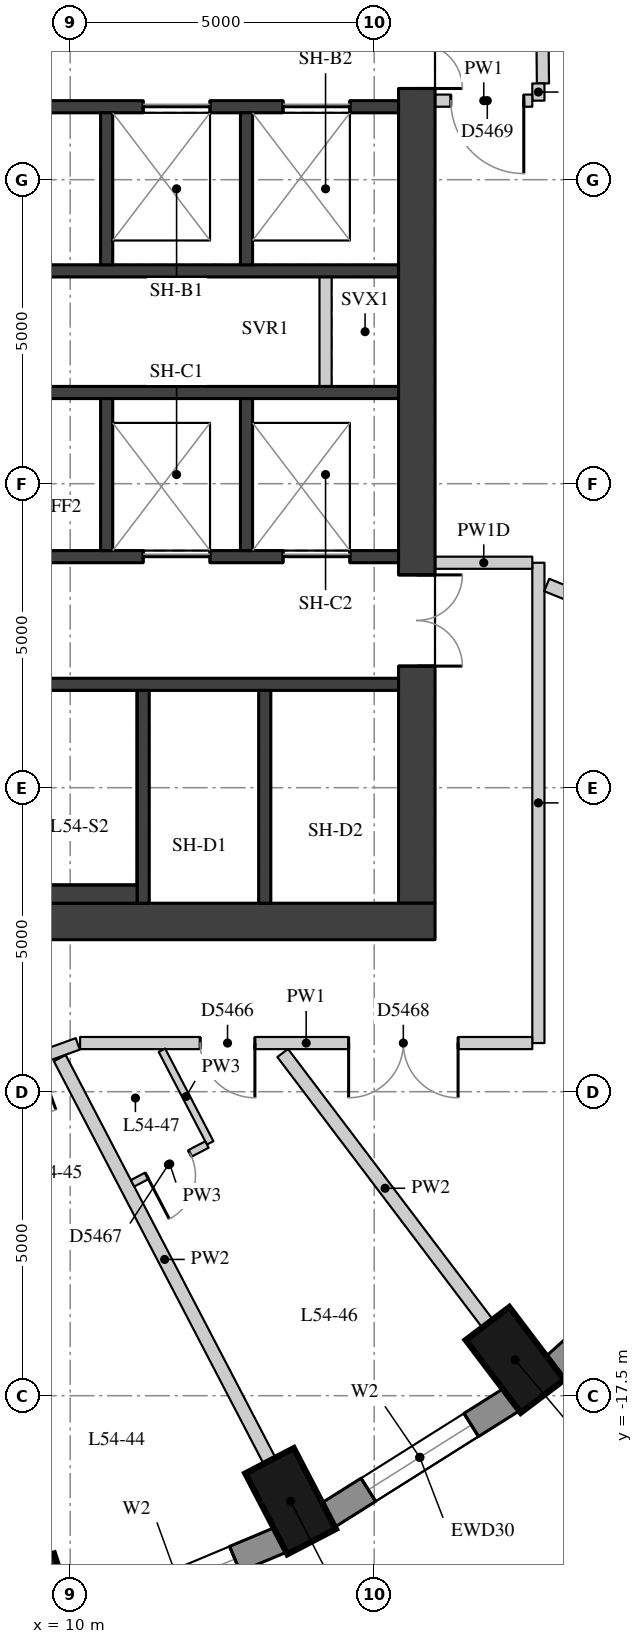
"""IFC4 building model, lengths in metres.
Left out: names, types, materials, properties, quantities, classifications, styles, units other than length and angle.
Written with IfcOpenShell. Run it as: python <this file> out.ifc"""

import sys

from ifc_helpers import new_model, si_unit, direction, frame, frame_2d, origin, origin_2d, place, context, subcontext, project, spatial, rectangle, extrude, element, fill, save


model = new_model("IFC4")
c1 = context("Model", 3, precision=1e-05, world=origin(), true_north=direction((0.0, 1.0)))
c2 = subcontext(c1, "Body", "Model", "MODEL_VIEW")
j1 = project(units=[si_unit("LENGTHUNIT", "METRE"), si_unit("PLANEANGLEUNIT", "RADIAN")], contexts=[c1])
p1 = place(None, origin())
s1 = spatial("IfcSite", under=j1, at=p1, CompositionType="ELEMENT")
p2 = place(p1, origin())
s2 = spatial("IfcBuilding", under=s1, at=p2, CompositionType="ELEMENT")
p3 = place(p2, frame((0.0, 0.0, 192.5)))
s3 = spatial("IfcBuildingStorey", under=s2, at=p3, CompositionType="ELEMENT", Elevation=192.5)
for number, where, z_axis, x_axis in (
    (1, (9.541, -20.948, 0.0), (0.0, 0.0, 1.0), (0.312, -0.95, 0.0)),
    (2, (13.625, -19.235, 0.0), (0.0, 0.0, 1.0), (0.462, -0.887, 0.0)),
    (3, (17.316, -16.911, 0.0), (0.0, 0.0, 1.0), (0.604, -0.797, 0.0)),
):
    element("IfcColumn", number, at=place(p3, frame(where, z_axis=z_axis, x_axis=x_axis)), inside=s3, PredefinedType="COLUMN", context=c2, shape_type="SweptSolid", body=[
        extrude(rectangle(XDim=1.5, YDim=0.9, at=origin_2d()), origin(), (0.0, 0.0, 1.0), 3.3),
    ])
p4 = place(p3, frame((10.103, -21.279, 0.0), z_axis=(0.0, 0.0, 1.0), x_axis=(0.922168222612, 0.386789050006, 0.0)))
e4 = element("IfcWall", 4, at=p4, inside=s3, PredefinedType="SOLIDWALL", context=c2, shape_type="SweptSolid", body=[
    extrude(rectangle(XDim=3.651, YDim=0.45, at=frame_2d((1.825, 0.0))), origin(), (0.0, 0.0, 1.0), 3.02),
])
p5 = place(p4, frame((0.825, 0.0, 0.4)))
e5 = element("IfcOpeningElement", 5, at=p5, cuts=e4, PredefinedType="OPENING", context=c2, shape_type="SweptSolid", body=[
    extrude(rectangle(XDim=2.0, YDim=1.75, at=frame_2d((1.0, 0.875))), frame((0.0, 0.235, 0.0), z_axis=(0.0, -1.0, 0.0), x_axis=(1.0, 0.0, 0.0)), (0.0, 0.0, 1.0), 0.47),
])
p6 = place(p3, frame((14.232, -19.47, 0.0), z_axis=(0.0, 0.0, 1.0), x_axis=(0.84614984472, 0.532945063098, 0.0)))
e6 = element("IfcWall", 6, at=p6, inside=s3, PredefinedType="SOLIDWALL", context=c2, shape_type="SweptSolid", body=[
    extrude(rectangle(XDim=3.586, YDim=0.45, at=frame_2d((1.793, 0.0))), origin(), (0.0, 0.0, 1.0), 3.02),
])
p7 = place(p6, frame((0.793, 0.0, 0.4)))
e7 = element("IfcOpeningElement", 7, at=p7, cuts=e6, PredefinedType="OPENING", context=c2, shape_type="SweptSolid", body=[
    extrude(rectangle(XDim=2.0, YDim=1.75, at=frame_2d((1.0, 0.875))), frame((0.0, 0.235, 0.0), z_axis=(0.0, -1.0, 0.0), x_axis=(1.0, 0.0, 0.0)), (0.0, 0.0, 1.0), 0.47),
])
p8 = place(p3, frame((17.953, -17.04, 0.0), z_axis=(0.0, 0.0, 1.0), x_axis=(0.743442727602, 0.668799604348, 0.0)))
e8 = element("IfcWall", 8, at=p8, inside=s3, PredefinedType="SOLIDWALL", context=c2, shape_type="SweptSolid", body=[
    extrude(rectangle(XDim=3.513, YDim=0.45, at=frame_2d((1.756, 0.0))), origin(), (0.0, 0.0, 1.0), 3.02),
])
p9 = place(p3, frame((15.7, -9.4, 0.0), z_axis=(0.0, 0.0, 1.0), x_axis=(0.0, 1.0, 0.0)))
e9 = element("IfcWall", 9, at=p9, inside=s3, PredefinedType="SHEAR", context=c2, shape_type="SweptSolid", body=[
    extrude(rectangle(XDim=18.8, YDim=0.6, at=frame_2d((9.4, 0.0))), origin(), (0.0, 0.0, 1.0), 3.02),
])
p10 = place(p9, frame((13.4, 0.0, 0.0)))
e10 = element("IfcOpeningElement", 10, at=p10, cuts=e9, PredefinedType="OPENING", context=c2, shape_type="SweptSolid", body=[
    extrude(rectangle(XDim=1.5, YDim=2.1, at=frame_2d((0.75, 1.05))), frame((0.0, 0.31, 0.0), z_axis=(0.0, -1.0, 0.0), x_axis=(1.0, 0.0, 0.0)), (0.0, 0.0, 1.0), 0.62),
])
p11 = place(p9, frame((3.9, 0.0, 0.0)))
e11 = element("IfcOpeningElement", 11, at=p11, cuts=e9, PredefinedType="OPENING", context=c2, shape_type="SweptSolid", body=[
    extrude(rectangle(XDim=1.5, YDim=2.1, at=frame_2d((0.75, 1.05))), frame((0.0, 0.31, 0.0), z_axis=(0.0, -1.0, 0.0), x_axis=(1.0, 0.0, 0.0)), (0.0, 0.0, 1.0), 0.62),
])
p12 = place(p3, frame((4.0, -9.7, 0.0), z_axis=(0.0, 0.0, 1.0), x_axis=(1.0, 0.0, 0.0)))
e12 = element("IfcWall", 12, at=p12, inside=s3, PredefinedType="SHEAR", context=c2, shape_type="SweptSolid", body=[
    extrude(rectangle(XDim=12.0, YDim=0.6, at=frame_2d((6.0, 0.0))), origin(), (0.0, 0.0, 1.0), 3.02),
])
p13 = place(p3, frame((4.6, 3.7, 0.0), z_axis=(0.0, 0.0, 1.0), x_axis=(1.0, 0.0, 0.0)))
e13 = element("IfcWall", 13, at=p13, inside=s3, PredefinedType="SHEAR", context=c2, shape_type="SweptSolid", body=[
    extrude(rectangle(XDim=10.8, YDim=0.2, at=frame_2d((5.4, 0.0))), origin(), (0.0, 0.0, 1.0), 3.02),
])
p14 = place(p13, frame((6.6, 0.0, 0.0)))
e14 = element("IfcOpeningElement", 14, at=p14, cuts=e13, PredefinedType="OPENING", context=c2, shape_type="SweptSolid", body=[
    extrude(rectangle(XDim=1.1, YDim=2.1, at=frame_2d((0.55, 1.05))), frame((0.0, 0.11, 0.0), z_axis=(0.0, -1.0, 0.0), x_axis=(1.0, 0.0, 0.0)), (0.0, 0.0, 1.0), 0.22),
])
p15 = place(p13, frame((8.9, 0.0, 0.0)))
e15 = element("IfcOpeningElement", 15, at=p15, cuts=e13, PredefinedType="OPENING", context=c2, shape_type="SweptSolid", body=[
    extrude(rectangle(XDim=1.1, YDim=2.1, at=frame_2d((0.55, 1.05))), frame((0.0, 0.11, 0.0), z_axis=(0.0, -1.0, 0.0), x_axis=(1.0, 0.0, 0.0)), (0.0, 0.0, 1.0), 0.22),
])
for number, where, z_axis, x_axis in (
    (16, (4.6, 1.0, 0.0), (0.0, 0.0, 1.0), (1.0, 0.0, 0.0)),
    (17, (4.6, -1.0, 0.0), (0.0, 0.0, 1.0), (1.0, 0.0, 0.0)),
):
    element("IfcWall", number, at=place(p3, frame(where, z_axis=z_axis, x_axis=x_axis)), inside=s3, PredefinedType="SHEAR", context=c2, shape_type="SweptSolid", body=[
        extrude(rectangle(XDim=10.8, YDim=0.2, at=frame_2d((5.4, 0.0))), origin(), (0.0, 0.0, 1.0), 3.02),
    ])
p16 = place(p3, frame((4.6, -3.7, 0.0), z_axis=(0.0, 0.0, 1.0), x_axis=(1.0, 0.0, 0.0)))
e18 = element("IfcWall", 18, at=p16, inside=s3, PredefinedType="SHEAR", context=c2, shape_type="SweptSolid", body=[
    extrude(rectangle(XDim=10.8, YDim=0.2, at=frame_2d((5.4, 0.0))), origin(), (0.0, 0.0, 1.0), 3.02),
])
p17 = place(p16, frame((6.6, 0.0, 0.0)))
e19 = element("IfcOpeningElement", 19, at=p17, cuts=e18, PredefinedType="OPENING", context=c2, shape_type="SweptSolid", body=[
    extrude(rectangle(XDim=1.1, YDim=2.1, at=frame_2d((0.55, 1.05))), frame((0.0, 0.11, 0.0), z_axis=(0.0, -1.0, 0.0), x_axis=(1.0, 0.0, 0.0)), (0.0, 0.0, 1.0), 0.22),
])
p18 = place(p16, frame((8.9, 0.0, 0.0)))
e20 = element("IfcOpeningElement", 20, at=p18, cuts=e18, PredefinedType="OPENING", context=c2, shape_type="SweptSolid", body=[
    extrude(rectangle(XDim=1.1, YDim=2.1, at=frame_2d((0.55, 1.05))), frame((0.0, 0.11, 0.0), z_axis=(0.0, -1.0, 0.0), x_axis=(1.0, 0.0, 0.0)), (0.0, 0.0, 1.0), 0.22),
])
p19 = place(p3, frame((4.6, -5.8, 0.0), z_axis=(0.0, 0.0, 1.0), x_axis=(1.0, 0.0, 0.0)))
e21 = element("IfcWall", 21, at=p19, inside=s3, PredefinedType="SHEAR", context=c2, shape_type="SweptSolid", body=[
    extrude(rectangle(XDim=10.8, YDim=0.2, at=frame_2d((5.4, 0.0))), origin(), (0.0, 0.0, 1.0), 3.02),
])
for number, where, z_axis, x_axis in (
    (22, (11.2, -9.4, 0.0), (0.0, 0.0, 1.0), (0.0, 1.0, 0.0)),
    (23, (13.2, -9.4, 0.0), (0.0, 0.0, 1.0), (0.0, 1.0, 0.0)),
):
    element("IfcWall", number, at=place(p3, frame(where, z_axis=z_axis, x_axis=x_axis)), inside=s3, PredefinedType="SHEAR", context=c2, shape_type="SweptSolid", body=[
        extrude(rectangle(XDim=3.5, YDim=0.2, at=frame_2d((1.75, 0.0))), origin(), (0.0, 0.0, 1.0), 3.02),
    ])
for number, where, z_axis, x_axis in (
    (24, (10.6, 1.1, 0.0), (0.0, 0.0, 1.0), (0.0, 1.0, 0.0)),
    (25, (10.6, -3.6, 0.0), (0.0, 0.0, 1.0), (0.0, 1.0, 0.0)),
    (26, (12.9, 1.1, 0.0), (0.0, 0.0, 1.0), (0.0, 1.0, 0.0)),
    (27, (12.9, -3.6, 0.0), (0.0, 0.0, 1.0), (0.0, 1.0, 0.0)),
):
    element("IfcWall", number, at=place(p3, frame(where, z_axis=z_axis, x_axis=x_axis)), inside=s3, PredefinedType="SHEAR", context=c2, shape_type="SweptSolid", body=[
        extrude(rectangle(XDim=2.5, YDim=0.2, at=frame_2d((1.25, 0.0))), origin(), (0.0, 0.0, 1.0), 3.02),
    ])
p20 = place(p3, frame((14.2, -0.9, 0.0), z_axis=(0.0, 0.0, 1.0), x_axis=(0.0, 1.0, 0.0)))
e28 = element("IfcWall", 28, at=p20, inside=s3, PredefinedType="PARTITIONING", context=c2, shape_type="SweptSolid", body=[
    extrude(rectangle(XDim=1.8, YDim=0.2, at=frame_2d((0.9, 0.0))), origin(), (0.0, 0.0, 1.0), 3.02),
])
p21 = place(p3, frame((6.22, -9.25, 0.0), z_axis=(0.0, 0.0, 1.0), x_axis=(1.0, 0.0, 0.0)))
e29 = element("IfcWall", 29, at=p21, inside=s3, PredefinedType="PARTITIONING", context=c2, shape_type="SweptSolid", body=[
    extrude(rectangle(XDim=4.88, YDim=0.3, at=frame_2d((2.44, 0.0))), origin(), (0.0, 0.0, 1.0), 3.02),
])
p22 = place(p3, frame((17.7, -3.8, 0.0), z_axis=(0.0, 0.0, 1.0), x_axis=(0.0, -1.0, 0.0)))
e30 = element("IfcWall", 30, at=p22, inside=s3, PredefinedType="PARTITIONING", context=c2, shape_type="SweptSolid", body=[
    extrude(rectangle(XDim=7.9, YDim=0.2, at=frame_2d((3.95, 0.0))), origin(), (0.0, 0.0, 1.0), 3.02),
])
p23 = place(p3, frame((17.6, -11.7, 0.0), z_axis=(0.0, 0.0, 1.0), x_axis=(-1.0, 0.0, 0.0)))
e31 = element("IfcWall", 31, at=p23, inside=s3, PredefinedType="PARTITIONING", context=c2, shape_type="SweptSolid", body=[
    extrude(rectangle(XDim=7.437, YDim=0.2, at=frame_2d((3.719, 0.0))), origin(), (0.0, 0.0, 1.0), 3.02),
])
p24 = place(p23, frame((4.562, 0.0, 0.0)))
e32 = element("IfcOpeningElement", 32, at=p24, cuts=e31, PredefinedType="OPENING", context=c2, shape_type="SweptSolid", body=[
    extrude(rectangle(XDim=0.9, YDim=2.1, at=frame_2d((0.45, 1.05))), frame((0.0, 0.11, 0.0), z_axis=(0.0, -1.0, 0.0), x_axis=(1.0, 0.0, 0.0)), (0.0, 0.0, 1.0), 0.22),
])
p25 = place(p23, frame((1.22, 0.0, 0.0)))
e33 = element("IfcOpeningElement", 33, at=p25, cuts=e31, PredefinedType="OPENING", context=c2, shape_type="SweptSolid", body=[
    extrude(rectangle(XDim=1.8, YDim=2.1, at=frame_2d((0.9, 1.05))), frame((0.0, 0.11, 0.0), z_axis=(0.0, -1.0, 0.0), x_axis=(1.0, 0.0, 0.0)), (0.0, 0.0, 1.0), 0.22),
])
p26 = place(p3, frame((10.125, -11.714, 0.0), z_axis=(0.0, 0.0, 1.0), x_axis=(-0.940958661946, -0.338521486038, 0.0)))
e34 = element("IfcWall", 34, at=p26, inside=s3, PredefinedType="PARTITIONING", context=c2, shape_type="SweptSolid", body=[
    extrude(rectangle(XDim=6.594, YDim=0.2, at=frame_2d((3.297, 0.0))), origin(), (0.0, 0.0, 1.0), 3.02),
])
p27 = place(p26, frame((3.809, 0.0, 0.0)))
e35 = element("IfcOpeningElement", 35, at=p27, cuts=e34, PredefinedType="OPENING", context=c2, shape_type="SweptSolid", body=[
    extrude(rectangle(XDim=0.9, YDim=2.1, at=frame_2d((0.45, 1.05))), frame((0.0, 0.11, 0.0), z_axis=(0.0, -1.0, 0.0), x_axis=(1.0, 0.0, 0.0)), (0.0, 0.0, 1.0), 0.22),
])
p28 = place(p26, frame((0.706, 0.0, 0.0)))
e36 = element("IfcOpeningElement", 36, at=p28, cuts=e34, PredefinedType="OPENING", context=c2, shape_type="SweptSolid", body=[
    extrude(rectangle(XDim=0.9, YDim=2.1, at=frame_2d((0.45, 1.05))), frame((0.0, 0.11, 0.0), z_axis=(0.0, -1.0, 0.0), x_axis=(1.0, 0.0, 0.0)), (0.0, 0.0, 1.0), 0.22),
])
p29 = place(p3, frame((17.701, 11.6, 0.0), z_axis=(0.0, 0.0, 1.0), x_axis=(0.009840700525, -0.999951579134, 0.0)))
e37 = element("IfcWall", 37, at=p29, inside=s3, PredefinedType="PARTITIONING", context=c2, shape_type="SweptSolid", body=[
    extrude(rectangle(XDim=7.517, YDim=0.2, at=frame_2d((3.759, 0.0))), origin(), (0.0, 0.0, 1.0), 3.02),
])
p30 = place(p3, frame((17.7, 4.083, 0.0), z_axis=(0.0, 0.0, 1.0), x_axis=(0.0, -1.0, 0.0)))
e38 = element("IfcWall", 38, at=p30, inside=s3, PredefinedType="PARTITIONING", context=c2, shape_type="SweptSolid", body=[
    extrude(rectangle(XDim=0.283, YDim=0.2, at=frame_2d((0.142, 0.0))), origin(), (0.0, 0.0, 1.0), 3.02),
])
p31 = place(p3, frame((17.6, 3.8, 0.0), z_axis=(0.0, 0.0, 1.0), x_axis=(-1.0, 0.0, 0.0)))
e39 = element("IfcWall", 39, at=p31, inside=s3, PredefinedType="PARTITIONING", context=c2, shape_type="SweptSolid", body=[
    extrude(rectangle(XDim=1.596, YDim=0.2, at=frame_2d((0.798, 0.0))), origin(), (0.0, 0.0, 1.0), 3.02),
])
p32 = place(p31, frame((0.14, 0.0, 0.0)))
e40 = element("IfcOpeningElement", 40, at=p32, cuts=e39, PredefinedType="OPENING", context=c2, shape_type="SweptSolid", body=[
    extrude(rectangle(XDim=1.2, YDim=2.1, at=frame_2d((0.6, 1.05))), frame((0.0, 0.11, 0.0), z_axis=(0.0, -1.0, 0.0), x_axis=(1.0, 0.0, 0.0)), (0.0, 0.0, 1.0), 0.22),
])
p33 = place(p3, frame((16.004, -3.8, 0.0), z_axis=(0.0, 0.0, 1.0), x_axis=(1.0, 0.0, 0.0)))
e41 = element("IfcWall", 41, at=p33, inside=s3, PredefinedType="PARTITIONING", context=c2, shape_type="SweptSolid", body=[
    extrude(rectangle(XDim=1.596, YDim=0.2, at=frame_2d((0.798, 0.0))), origin(), (0.0, 0.0, 1.0), 2.47),
])
p34 = place(p3, frame((13.279, -18.57, 0.0), z_axis=(0.0, 0.0, 1.0), x_axis=(-0.461996036885, 0.886881988712, 0.0)))
e42 = element("IfcWall", 42, at=p34, inside=s3, PredefinedType="PARTITIONING", context=c2, shape_type="SweptSolid", body=[
    extrude(rectangle(XDim=7.467, YDim=0.22, at=frame_2d((3.733, 0.0))), origin(), (0.0, 0.0, 1.0), 3.02),
])
p35 = place(p3, frame((16.863, -16.312, 0.0), z_axis=(0.0, 0.0, 1.0), x_axis=(-0.603626861738, 0.797266963939, 0.0)))
e43 = element("IfcWall", 43, at=p35, inside=s3, PredefinedType="PARTITIONING", context=c2, shape_type="SweptSolid", body=[
    extrude(rectangle(XDim=5.58, YDim=0.22, at=frame_2d((2.79, 0.0))), origin(), (0.0, 0.0, 1.0), 3.02),
])
p36 = place(p3, frame((24.295, -6.771, 0.0), z_axis=(0.0, 0.0, 1.0), x_axis=(-0.927387137769, 0.374103056256, 0.0)))
e44 = element("IfcWall", 44, at=p36, inside=s3, PredefinedType="PARTITIONING", context=c2, shape_type="SweptSolid", body=[
    extrude(rectangle(XDim=6.964, YDim=0.22, at=frame_2d((3.482, 0.0))), origin(), (0.0, 0.0, 1.0), 3.02),
])
p37 = place(p3, frame((11.509, -11.818, 0.0), z_axis=(0.0, 0.0, 1.0), x_axis=(0.461987980812, -0.886886185249, 0.0)))
e45 = element("IfcWall", 45, at=p37, inside=s3, PredefinedType="PARTITIONING", context=c2, shape_type="SweptSolid", body=[
    extrude(rectangle(XDim=1.718, YDim=0.12, at=frame_2d((0.859, 0.0))), origin(), (0.0, 0.0, 1.0), 3.02),
])
p38 = place(p3, frame((12.249, -13.369, 0.0), z_axis=(0.0, 0.0, 1.0), x_axis=(-0.886834011057, -0.462088126695, 0.0)))
e46 = element("IfcWall", 46, at=p38, inside=s3, PredefinedType="PARTITIONING", context=c2, shape_type="SweptSolid", body=[
    extrude(rectangle(XDim=1.379, YDim=0.12, at=frame_2d((0.69, 0.0))), origin(), (0.0, 0.0, 1.0), 3.02),
])
p39 = place(p38, frame((0.315, 0.0, 0.0)))
e47 = element("IfcOpeningElement", 47, at=p39, cuts=e46, PredefinedType="OPENING", context=c2, shape_type="SweptSolid", body=[
    extrude(rectangle(XDim=0.8, YDim=2.1, at=frame_2d((0.4, 1.05))), frame((0.0, 0.07, 0.0), z_axis=(0.0, -1.0, 0.0), x_axis=(1.0, 0.0, 0.0)), (0.0, 0.0, 1.0), 0.14),
])
p40 = place(p5, origin())
e48 = element("IfcWindow", 48, at=p40, inside=s3, PartitioningType="SINGLE_PANEL", PredefinedType="WINDOW", context=c2, shape_type="SweptSolid", body=[
    extrude(rectangle(XDim=2.0, YDim=1.75, at=frame_2d((1.0, 0.875))), frame((0.0, 0.035, 0.0), z_axis=(0.0, -1.0, 0.0), x_axis=(1.0, 0.0, 0.0)), (0.0, 0.0, 1.0), 0.06),
])
fill(e5, e48)
p41 = place(p7, origin())
e49 = element("IfcWindow", 49, at=p41, inside=s3, PartitioningType="SINGLE_PANEL", PredefinedType="WINDOW", context=c2, shape_type="SweptSolid", body=[
    extrude(rectangle(XDim=2.0, YDim=1.75, at=frame_2d((1.0, 0.875))), frame((0.0, 0.035, 0.0), z_axis=(0.0, -1.0, 0.0), x_axis=(1.0, 0.0, 0.0)), (0.0, 0.0, 1.0), 0.06),
])
fill(e7, e49)
p42 = place(p10, origin())
e50 = element("IfcDoor", 50, at=p42, inside=s3, OperationType="DOUBLE_DOOR_SINGLE_SWING", PredefinedType="DOOR", context=c2, shape_type="SweptSolid", body=[
    extrude(rectangle(XDim=1.5, YDim=2.1, at=frame_2d((0.75, 1.05))), frame((0.0, 0.025, 0.0), z_axis=(0.0, -1.0, 0.0), x_axis=(1.0, 0.0, 0.0)), (0.0, 0.0, 1.0), 0.05),
])
fill(e10, e50)
p43 = place(p11, origin())
e51 = element("IfcDoor", 51, at=p43, inside=s3, OperationType="DOUBLE_DOOR_SINGLE_SWING", PredefinedType="DOOR", context=c2, shape_type="SweptSolid", body=[
    extrude(rectangle(XDim=1.5, YDim=2.1, at=frame_2d((0.75, 1.05))), frame((0.0, 0.025, 0.0), z_axis=(0.0, -1.0, 0.0), x_axis=(1.0, 0.0, 0.0)), (0.0, 0.0, 1.0), 0.05),
])
fill(e11, e51)
p44 = place(p14, origin())
e52 = element("IfcDoor", 52, at=p44, inside=s3, OperationType="DOUBLE_DOOR_SLIDING", PredefinedType="DOOR", context=c2, shape_type="SweptSolid", body=[
    extrude(rectangle(XDim=1.1, YDim=2.1, at=frame_2d((0.55, 1.05))), frame((0.0, 0.025, 0.0), z_axis=(0.0, -1.0, 0.0), x_axis=(1.0, 0.0, 0.0)), (0.0, 0.0, 1.0), 0.05),
])
fill(e14, e52)
p45 = place(p15, origin())
e53 = element("IfcDoor", 53, at=p45, inside=s3, OperationType="DOUBLE_DOOR_SLIDING", PredefinedType="DOOR", context=c2, shape_type="SweptSolid", body=[
    extrude(rectangle(XDim=1.1, YDim=2.1, at=frame_2d((0.55, 1.05))), frame((0.0, 0.025, 0.0), z_axis=(0.0, -1.0, 0.0), x_axis=(1.0, 0.0, 0.0)), (0.0, 0.0, 1.0), 0.05),
])
fill(e15, e53)
p46 = place(p17, origin())
e54 = element("IfcDoor", 54, at=p46, inside=s3, OperationType="DOUBLE_DOOR_SLIDING", PredefinedType="DOOR", context=c2, shape_type="SweptSolid", body=[
    extrude(rectangle(XDim=1.1, YDim=2.1, at=frame_2d((0.55, 1.05))), frame((0.0, 0.025, 0.0), z_axis=(0.0, -1.0, 0.0), x_axis=(1.0, 0.0, 0.0)), (0.0, 0.0, 1.0), 0.05),
])
fill(e19, e54)
p47 = place(p18, origin())
e55 = element("IfcDoor", 55, at=p47, inside=s3, OperationType="DOUBLE_DOOR_SLIDING", PredefinedType="DOOR", context=c2, shape_type="SweptSolid", body=[
    extrude(rectangle(XDim=1.1, YDim=2.1, at=frame_2d((0.55, 1.05))), frame((0.0, 0.025, 0.0), z_axis=(0.0, -1.0, 0.0), x_axis=(1.0, 0.0, 0.0)), (0.0, 0.0, 1.0), 0.05),
])
fill(e20, e55)
p48 = place(p24, origin())
e56 = element("IfcDoor", 56, at=p48, inside=s3, OperationType="SINGLE_SWING_LEFT", PredefinedType="DOOR", context=c2, shape_type="SweptSolid", body=[
    extrude(rectangle(XDim=0.9, YDim=2.1, at=frame_2d((0.45, 1.05))), frame((0.0, 0.025, 0.0), z_axis=(0.0, -1.0, 0.0), x_axis=(1.0, 0.0, 0.0)), (0.0, 0.0, 1.0), 0.05),
])
fill(e32, e56)
p49 = place(p39, origin())
e57 = element("IfcDoor", 57, at=p49, inside=s3, OperationType="SINGLE_SWING_RIGHT", PredefinedType="DOOR", context=c2, shape_type="SweptSolid", body=[
    extrude(rectangle(XDim=0.8, YDim=2.1, at=frame_2d((0.4, 1.05))), frame((0.0, 0.025, 0.0), z_axis=(0.0, -1.0, 0.0), x_axis=(1.0, 0.0, 0.0)), (0.0, 0.0, 1.0), 0.05),
])
fill(e47, e57)
p50 = place(p25, origin())
e58 = element("IfcDoor", 58, at=p50, inside=s3, OperationType="DOUBLE_DOOR_SINGLE_SWING", PredefinedType="DOOR", context=c2, shape_type="SweptSolid", body=[
    extrude(rectangle(XDim=1.8, YDim=2.1, at=frame_2d((0.9, 1.05))), frame((0.0, 0.025, 0.0), z_axis=(0.0, -1.0, 0.0), x_axis=(1.0, 0.0, 0.0)), (0.0, 0.0, 1.0), 0.05),
])
fill(e33, e58)
p51 = place(p32, origin())
e59 = element("IfcDoor", 59, at=p51, inside=s3, OperationType="SINGLE_SWING_LEFT", PredefinedType="DOOR", context=c2, shape_type="SweptSolid", body=[
    extrude(rectangle(XDim=1.2, YDim=2.1, at=frame_2d((0.6, 1.05))), frame((0.0, 0.025, 0.0), z_axis=(0.0, -1.0, 0.0), x_axis=(1.0, 0.0, 0.0)), (0.0, 0.0, 1.0), 0.05),
])
fill(e40, e59)
save(model, sys.argv[1])
